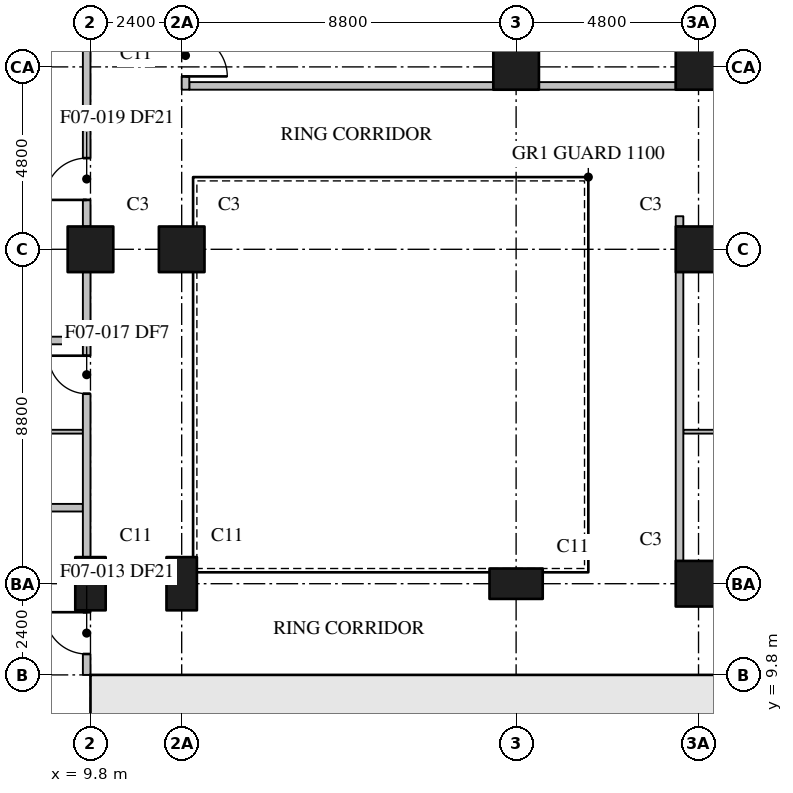
"""IFC4 building model, lengths in metres.
Left out: names, types, materials, properties, quantities, classifications, styles, units other than length and angle.
Written with IfcOpenShell. Run it as: python <this file> out.ifc"""

import sys

from ifc_helpers import new_model, si_unit, direction, frame, frame_2d, origin, origin_2d, place, context, subcontext, project, spatial, rectangle, extrude, element, fill, save


model = new_model("IFC4")
c1 = context("Model", 3, precision=1e-05, world=origin(), true_north=direction((0.0, 1.0)))
c2 = subcontext(c1, "Body", "Model", "MODEL_VIEW")
j1 = project(units=[si_unit("LENGTHUNIT", "METRE"), si_unit("PLANEANGLEUNIT", "RADIAN")], contexts=[c1])
p1 = place(None, origin())
s1 = spatial("IfcSite", under=j1, at=p1, CompositionType="ELEMENT")
p2 = place(p1, origin())
s2 = spatial("IfcBuilding", under=s1, at=p2, CompositionType="ELEMENT")
p3 = place(p2, frame((0.0, 0.0, 87.1)))
s3 = spatial("IfcBuildingStorey", under=s2, at=p3, CompositionType="ELEMENT", Elevation=87.1)
p4 = place(p3, frame((9.8, 12.2, 0.0), z_axis=(0.0, 0.0, 1.0), x_axis=(0.0, 1.0, 0.0)))
e1 = element("IfcColumn", 1, at=p4, inside=s3, PredefinedType="COLUMN", context=c2, shape_type="SweptSolid", body=[
    extrude(rectangle(XDim=1.4, YDim=0.8, at=origin_2d()), origin(), (0.0, 0.0, 1.0), 3.7),
])
p5 = place(p3, frame((9.8, 21.0, 0.0), z_axis=(0.0, 0.0, 1.0), x_axis=(1.0, 0.0, 0.0)))
e2 = element("IfcColumn", 2, at=p5, inside=s3, PredefinedType="COLUMN", context=c2, shape_type="SweptSolid", body=[
    extrude(rectangle(XDim=1.2, YDim=1.2, at=origin_2d()), origin(), (0.0, 0.0, 1.0), 3.7),
])
p6 = place(p3, frame((12.2, 12.2, 0.0), z_axis=(0.0, 0.0, 1.0), x_axis=(0.0, 1.0, 0.0)))
e3 = element("IfcColumn", 3, at=p6, inside=s3, PredefinedType="COLUMN", context=c2, shape_type="SweptSolid", body=[
    extrude(rectangle(XDim=1.4, YDim=0.8, at=origin_2d()), origin(), (0.0, 0.0, 1.0), 3.7),
])
p7 = place(p3, frame((12.2, 21.0, 0.0), z_axis=(0.0, 0.0, 1.0), x_axis=(1.0, 0.0, 0.0)))
e4 = element("IfcColumn", 4, at=p7, inside=s3, PredefinedType="COLUMN", context=c2, shape_type="SweptSolid", body=[
    extrude(rectangle(XDim=1.2, YDim=1.2, at=origin_2d()), origin(), (0.0, 0.0, 1.0), 3.7),
])
p8 = place(p3, frame((21.0, 12.2, 0.0), z_axis=(0.0, 0.0, 1.0), x_axis=(1.0, 0.0, 0.0)))
e5 = element("IfcColumn", 5, at=p8, inside=s3, PredefinedType="COLUMN", context=c2, shape_type="SweptSolid", body=[
    extrude(rectangle(XDim=1.4, YDim=0.8, at=origin_2d()), origin(), (0.0, 0.0, 1.0), 3.7),
])
for number, where, z_axis, x_axis in (
    (6, (21.0, 25.8, 0.0), (0.0, 0.0, 1.0), (1.0, 0.0, 0.0)),
    (7, (25.8, 12.2, 0.0), (0.0, 0.0, 1.0), (1.0, 0.0, 0.0)),
    (8, (25.8, 21.0, 0.0), (0.0, 0.0, 1.0), (1.0, 0.0, 0.0)),
    (9, (25.8, 25.8, 0.0), (0.0, 0.0, 1.0), (1.0, 0.0, 0.0)),
):
    element("IfcColumn", number, at=place(p3, frame(where, z_axis=z_axis, x_axis=x_axis)), inside=s3, PredefinedType="COLUMN", context=c2, shape_type="SweptSolid", body=[
        extrude(rectangle(XDim=1.2, YDim=1.2, at=origin_2d()), origin(), (0.0, 0.0, 1.0), 3.7),
    ])
p9 = place(p3, frame((10.6, 1.2, 0.0), z_axis=(0.0, 0.0, 1.0), x_axis=(0.0, 1.0, 0.0)))
e10 = element("IfcWall", 10, at=p9, inside=s3, PredefinedType="SHEAR", context=c2, shape_type="SweptSolid", body=[
    extrude(rectangle(XDim=8.6, YDim=0.8, at=frame_2d((4.3, 0.0))), origin(), (0.0, 0.0, 1.0), 3.7),
])
p10 = place(p3, frame((9.8, 9.6, 0.0), z_axis=(0.0, 0.0, 1.0), x_axis=(1.0, 0.0, 0.0)))
e11 = element("IfcWall", 11, at=p10, inside=s3, PredefinedType="SHEAR", context=c2, shape_type="SweptSolid", body=[
    extrude(rectangle(XDim=4.3, YDim=0.4, at=frame_2d((2.15, 0.0))), origin(), (0.0, 0.0, 1.0), 3.7),
])
p11 = place(p10, frame((2.05, 0.0, 0.0)))
e12 = element("IfcOpeningElement", 12, at=p11, cuts=e11, PredefinedType="OPENING", context=c2, shape_type="SweptSolid", body=[
    extrude(rectangle(XDim=1.2, YDim=2.1, at=frame_2d((0.6, 1.05))), frame((0.0, 0.21, 0.0), z_axis=(0.0, -1.0, 0.0), x_axis=(1.0, 0.0, 0.0)), (0.0, 0.0, 1.0), 0.42),
])
p12 = place(p3, frame((14.1, 9.6, 0.0), z_axis=(0.0, 0.0, 1.0), x_axis=(1.0, 0.0, 0.0)))
e13 = element("IfcWall", 13, at=p12, inside=s3, PredefinedType="SHEAR", context=c2, shape_type="SweptSolid", body=[
    extrude(rectangle(XDim=10.4, YDim=0.4, at=frame_2d((5.2, 0.0))), origin(), (0.0, 0.0, 1.0), 3.7),
])
p13 = place(p12, frame((0.8, 0.0, 0.0)))
e14 = element("IfcOpeningElement", 14, at=p13, cuts=e13, PredefinedType="OPENING", context=c2, shape_type="SweptSolid", body=[
    extrude(rectangle(XDim=1.0, YDim=2.1, at=frame_2d((0.5, 1.05))), frame((0.0, 0.21, 0.0), z_axis=(0.0, -1.0, 0.0), x_axis=(1.0, 0.0, 0.0)), (0.0, 0.0, 1.0), 0.42),
])
p14 = place(p12, frame((6.0, 0.0, 0.0)))
e15 = element("IfcOpeningElement", 15, at=p14, cuts=e13, PredefinedType="OPENING", context=c2, shape_type="SweptSolid", body=[
    extrude(rectangle(XDim=1.0, YDim=2.1, at=frame_2d((0.5, 1.05))), frame((0.0, 0.21, 0.0), z_axis=(0.0, -1.0, 0.0), x_axis=(1.0, 0.0, 0.0)), (0.0, 0.0, 1.0), 0.42),
])
p15 = place(p3, frame((14.1, 1.2, 0.0), z_axis=(0.0, 0.0, 1.0), x_axis=(0.0, 1.0, 0.0)))
e16 = element("IfcWall", 16, at=p15, inside=s3, PredefinedType="SHEAR", context=c2, shape_type="SweptSolid", body=[
    extrude(rectangle(XDim=8.4, YDim=0.4, at=frame_2d((4.2, 0.0))), origin(), (0.0, 0.0, 1.0), 3.7),
])
p16 = place(p15, frame((4.45, 0.0, 0.0)))
e17 = element("IfcOpeningElement", 17, at=p16, cuts=e16, PredefinedType="OPENING", context=c2, shape_type="SweptSolid", body=[
    extrude(rectangle(XDim=0.9, YDim=2.1, at=frame_2d((0.45, 1.05))), frame((0.0, 0.21, 0.0), z_axis=(0.0, -1.0, 0.0), x_axis=(1.0, 0.0, 0.0)), (0.0, 0.0, 1.0), 0.42),
])
p17 = place(p3, frame((24.5, 7.0, 0.0), z_axis=(0.0, 0.0, 1.0), x_axis=(0.0, 1.0, 0.0)))
e18 = element("IfcWall", 18, at=p17, inside=s3, PredefinedType="SHEAR", context=c2, shape_type="SweptSolid", body=[
    extrude(rectangle(XDim=2.4, YDim=0.25, at=frame_2d((1.2, 0.0))), origin(), (0.0, 0.0, 1.0), 3.7),
])
p18 = place(p3, frame((19.3, 7.0, 0.0), z_axis=(0.0, 0.0, 1.0), x_axis=(0.0, 1.0, 0.0)))
e19 = element("IfcWall", 19, at=p18, inside=s3, PredefinedType="PARTITIONING", context=c2, shape_type="SweptSolid", body=[
    extrude(rectangle(XDim=2.4, YDim=0.15, at=frame_2d((1.2, 0.0))), origin(), (0.0, 0.0, 1.0), 3.4),
])
p19 = place(p3, frame((25.3, 12.8, 0.0), z_axis=(0.0, 0.0, 1.0), x_axis=(0.0, 1.0, 0.0)))
e20 = element("IfcWall", 20, at=p19, inside=s3, PredefinedType="PARTITIONING", context=c2, shape_type="SweptSolid", body=[
    extrude(rectangle(XDim=7.6, YDim=0.2, at=frame_2d((3.8, 0.0))), origin(), (0.0, 0.0, 1.0), 3.4),
])
p20 = place(p3, frame((25.3, 21.6, 0.0), z_axis=(0.0, 0.0, 1.0), x_axis=(0.0, 1.0, 0.0)))
e21 = element("IfcWall", 21, at=p20, inside=s3, PredefinedType="PARTITIONING", context=c2, shape_type="SweptSolid", body=[
    extrude(rectangle(XDim=0.27, YDim=0.2, at=frame_2d((0.135, 0.0))), origin(), (0.0, 0.0, 1.0), 3.4),
])
p21 = place(p3, frame((9.7, 9.8, 0.0), z_axis=(0.0, 0.0, 1.0), x_axis=(0.0, 1.0, 0.0)))
e22 = element("IfcWall", 22, at=p21, inside=s3, PredefinedType="PARTITIONING", context=c2, shape_type="SweptSolid", body=[
    extrude(rectangle(XDim=1.7, YDim=0.2, at=frame_2d((0.85, 0.0))), origin(), (0.0, 0.0, 1.0), 3.4),
])
p22 = place(p21, frame((0.55, 0.0, 0.0)))
e23 = element("IfcOpeningElement", 23, at=p22, cuts=e22, PredefinedType="OPENING", context=c2, shape_type="SweptSolid", body=[
    extrude(rectangle(XDim=1.1, YDim=2.1, at=frame_2d((0.55, 1.05))), frame((0.0, 0.11, 0.0), z_axis=(0.0, -1.0, 0.0), x_axis=(1.0, 0.0, 0.0)), (0.0, 0.0, 1.0), 0.22),
])
p23 = place(p3, frame((9.7, 12.9, 0.0), z_axis=(0.0, 0.0, 1.0), x_axis=(0.0, 1.0, 0.0)))
e24 = element("IfcWall", 24, at=p23, inside=s3, PredefinedType="PARTITIONING", context=c2, shape_type="SweptSolid", body=[
    extrude(rectangle(XDim=7.5, YDim=0.2, at=frame_2d((3.75, 0.0))), origin(), (0.0, 0.0, 1.0), 3.4),
])
p24 = place(p23, frame((4.3, 0.0, 0.0)))
e25 = element("IfcOpeningElement", 25, at=p24, cuts=e24, PredefinedType="OPENING", context=c2, shape_type="SweptSolid", body=[
    extrude(rectangle(XDim=1.0, YDim=2.1, at=frame_2d((0.5, 1.05))), frame((0.0, 0.11, 0.0), z_axis=(0.0, -1.0, 0.0), x_axis=(1.0, 0.0, 0.0)), (0.0, 0.0, 1.0), 0.22),
])
p25 = place(p3, frame((9.7, 21.6, 0.0), z_axis=(0.0, 0.0, 1.0), x_axis=(0.0, 1.0, 0.0)))
e26 = element("IfcWall", 26, at=p25, inside=s3, PredefinedType="PARTITIONING", context=c2, shape_type="SweptSolid", body=[
    extrude(rectangle(XDim=5.1, YDim=0.2, at=frame_2d((2.55, 0.0))), origin(), (0.0, 0.0, 1.0), 3.4),
])
p26 = place(p25, frame((0.7, 0.0, 0.0)))
e27 = element("IfcOpeningElement", 27, at=p26, cuts=e26, PredefinedType="OPENING", context=c2, shape_type="SweptSolid", body=[
    extrude(rectangle(XDim=1.1, YDim=2.1, at=frame_2d((0.55, 1.05))), frame((0.0, 0.11, 0.0), z_axis=(0.0, -1.0, 0.0), x_axis=(1.0, 0.0, 0.0)), (0.0, 0.0, 1.0), 0.22),
])
for number, where, z_axis, x_axis in (
    (28, (0.31, 14.2, 0.0), (0.0, 0.0, 1.0), (1.0, 0.0, 0.0)),
    (29, (0.31, 18.6, 0.0), (0.0, 0.0, 1.0), (1.0, 0.0, 0.0)),
):
    element("IfcWall", number, at=place(p3, frame(where, z_axis=z_axis, x_axis=x_axis)), inside=s3, PredefinedType="PARTITIONING", context=c2, shape_type="SweptSolid", body=[
        extrude(rectangle(XDim=9.29, YDim=0.2, at=frame_2d((4.645, 0.0))), origin(), (0.0, 0.0, 1.0), 3.4),
    ])
p27 = place(p3, frame((12.3, 26.7, 0.0), z_axis=(0.0, 0.0, 1.0), x_axis=(0.0, -1.0, 0.0)))
e30 = element("IfcWall", 30, at=p27, inside=s3, PredefinedType="PARTITIONING", context=c2, shape_type="SweptSolid", body=[
    extrude(rectangle(XDim=1.5, YDim=0.2, at=frame_2d((0.75, 0.0))), origin(), (0.0, 0.0, 1.0), 3.4),
])
p28 = place(p27, frame((0.05, 0.0, 0.0)))
e31 = element("IfcOpeningElement", 31, at=p28, cuts=e30, PredefinedType="OPENING", context=c2, shape_type="SweptSolid", body=[
    extrude(rectangle(XDim=1.1, YDim=2.1, at=frame_2d((0.55, 1.05))), frame((0.0, 0.11, 0.0), z_axis=(0.0, -1.0, 0.0), x_axis=(1.0, 0.0, 0.0)), (0.0, 0.0, 1.0), 0.22),
])
p29 = place(p3, frame((12.4, 25.3, 0.0), z_axis=(0.0, 0.0, 1.0), x_axis=(1.0, 0.0, 0.0)))
e32 = element("IfcWall", 32, at=p29, inside=s3, PredefinedType="PARTITIONING", context=c2, shape_type="SweptSolid", body=[
    extrude(rectangle(XDim=8.0, YDim=0.2, at=frame_2d((4.0, 0.0))), origin(), (0.0, 0.0, 1.0), 3.4),
])
p30 = place(p3, frame((21.6, 25.3, 0.0), z_axis=(0.0, 0.0, 1.0), x_axis=(1.0, 0.0, 0.0)))
e33 = element("IfcWall", 33, at=p30, inside=s3, PredefinedType="PARTITIONING", context=c2, shape_type="SweptSolid", body=[
    extrude(rectangle(XDim=3.6, YDim=0.2, at=frame_2d((1.8, 0.0))), origin(), (0.0, 0.0, 1.0), 3.4),
])
p31 = place(p3, frame((9.6, 16.2, 0.0), z_axis=(0.0, 0.0, 1.0), x_axis=(-1.0, 0.0, 0.0)))
e34 = element("IfcWall", 34, at=p31, inside=s3, PredefinedType="PARTITIONING", context=c2, shape_type="SweptSolid", body=[
    extrude(rectangle(XDim=3.35, YDim=0.1, at=frame_2d((1.675, 0.0))), origin(), (0.0, 0.0, 1.0), 3.4),
])
p32 = place(p31, frame((1.05, 0.0, 0.0)))
e35 = element("IfcOpeningElement", 35, at=p32, cuts=e34, PredefinedType="OPENING", context=c2, shape_type="SweptSolid", body=[
    extrude(rectangle(XDim=0.9, YDim=2.1, at=frame_2d((0.45, 1.05))), frame((0.0, 0.06, 0.0), z_axis=(0.0, -1.0, 0.0), x_axis=(1.0, 0.0, 0.0)), (0.0, 0.0, 1.0), 0.12),
])
p33 = place(p3, frame((25.4, 16.2, 0.0), z_axis=(0.0, 0.0, 1.0), x_axis=(1.0, 0.0, 0.0)))
e36 = element("IfcWall", 36, at=p33, inside=s3, PredefinedType="PARTITIONING", context=c2, shape_type="SweptSolid", body=[
    extrude(rectangle(XDim=2.95, YDim=0.1, at=frame_2d((1.475, 0.0))), origin(), (0.0, 0.0, 1.0), 3.4),
])
p34 = place(p13, frame((1.0, 0.0, 0.0), z_axis=(0.0, 0.0, 1.0), x_axis=(-1.0, 0.0, 0.0)))
e37 = element("IfcDoor", 37, at=p34, inside=s3, OperationType="SINGLE_SWING_RIGHT", PredefinedType="DOOR", context=c2, shape_type="SweptSolid", body=[
    extrude(rectangle(XDim=1.0, YDim=2.1, at=frame_2d((0.5, 1.05))), frame((0.0, 0.025, 0.0), z_axis=(0.0, -1.0, 0.0), x_axis=(1.0, 0.0, 0.0)), (0.0, 0.0, 1.0), 0.05),
])
fill(e14, e37)
p35 = place(p14, frame((1.0, 0.0, 0.0), z_axis=(0.0, 0.0, 1.0), x_axis=(-1.0, 0.0, 0.0)))
e38 = element("IfcDoor", 38, at=p35, inside=s3, OperationType="SINGLE_SWING_LEFT", PredefinedType="DOOR", context=c2, shape_type="SweptSolid", body=[
    extrude(rectangle(XDim=1.0, YDim=2.1, at=frame_2d((0.5, 1.05))), frame((0.0, 0.025, 0.0), z_axis=(0.0, -1.0, 0.0), x_axis=(1.0, 0.0, 0.0)), (0.0, 0.0, 1.0), 0.05),
])
fill(e15, e38)
p36 = place(p11, frame((1.2, 0.0, 0.0), z_axis=(0.0, 0.0, 1.0), x_axis=(-1.0, 0.0, 0.0)))
e39 = element("IfcDoor", 39, at=p36, inside=s3, OperationType="SINGLE_SWING_LEFT", PredefinedType="DOOR", context=c2, shape_type="SweptSolid", body=[
    extrude(rectangle(XDim=1.2, YDim=2.1, at=frame_2d((0.6, 1.05))), frame((0.0, 0.025, 0.0), z_axis=(0.0, -1.0, 0.0), x_axis=(1.0, 0.0, 0.0)), (0.0, 0.0, 1.0), 0.05),
])
fill(e12, e39)
p37 = place(p22, origin())
e40 = element("IfcDoor", 40, at=p37, inside=s3, OperationType="SINGLE_SWING_RIGHT", PredefinedType="DOOR", context=c2, shape_type="SweptSolid", body=[
    extrude(rectangle(XDim=1.1, YDim=2.1, at=frame_2d((0.55, 1.05))), frame((0.0, 0.025, 0.0), z_axis=(0.0, -1.0, 0.0), x_axis=(1.0, 0.0, 0.0)), (0.0, 0.0, 1.0), 0.05),
])
fill(e23, e40)
p38 = place(p24, origin())
e41 = element("IfcDoor", 41, at=p38, inside=s3, OperationType="SINGLE_SWING_RIGHT", PredefinedType="DOOR", context=c2, shape_type="SweptSolid", body=[
    extrude(rectangle(XDim=1.0, YDim=2.1, at=frame_2d((0.5, 1.05))), frame((0.0, 0.025, 0.0), z_axis=(0.0, -1.0, 0.0), x_axis=(1.0, 0.0, 0.0)), (0.0, 0.0, 1.0), 0.05),
])
fill(e25, e41)
p39 = place(p26, origin())
e42 = element("IfcDoor", 42, at=p39, inside=s3, OperationType="SINGLE_SWING_LEFT", PredefinedType="DOOR", context=c2, shape_type="SweptSolid", body=[
    extrude(rectangle(XDim=1.1, YDim=2.1, at=frame_2d((0.55, 1.05))), frame((0.0, 0.025, 0.0), z_axis=(0.0, -1.0, 0.0), x_axis=(1.0, 0.0, 0.0)), (0.0, 0.0, 1.0), 0.05),
])
fill(e27, e42)
p40 = place(p28, origin())
e43 = element("IfcDoor", 43, at=p40, inside=s3, OperationType="SINGLE_SWING_RIGHT", PredefinedType="DOOR", context=c2, shape_type="SweptSolid", body=[
    extrude(rectangle(XDim=1.1, YDim=2.1, at=frame_2d((0.55, 1.05))), frame((0.0, 0.025, 0.0), z_axis=(0.0, -1.0, 0.0), x_axis=(1.0, 0.0, 0.0)), (0.0, 0.0, 1.0), 0.05),
])
fill(e31, e43)
save(model, sys.argv[1])
